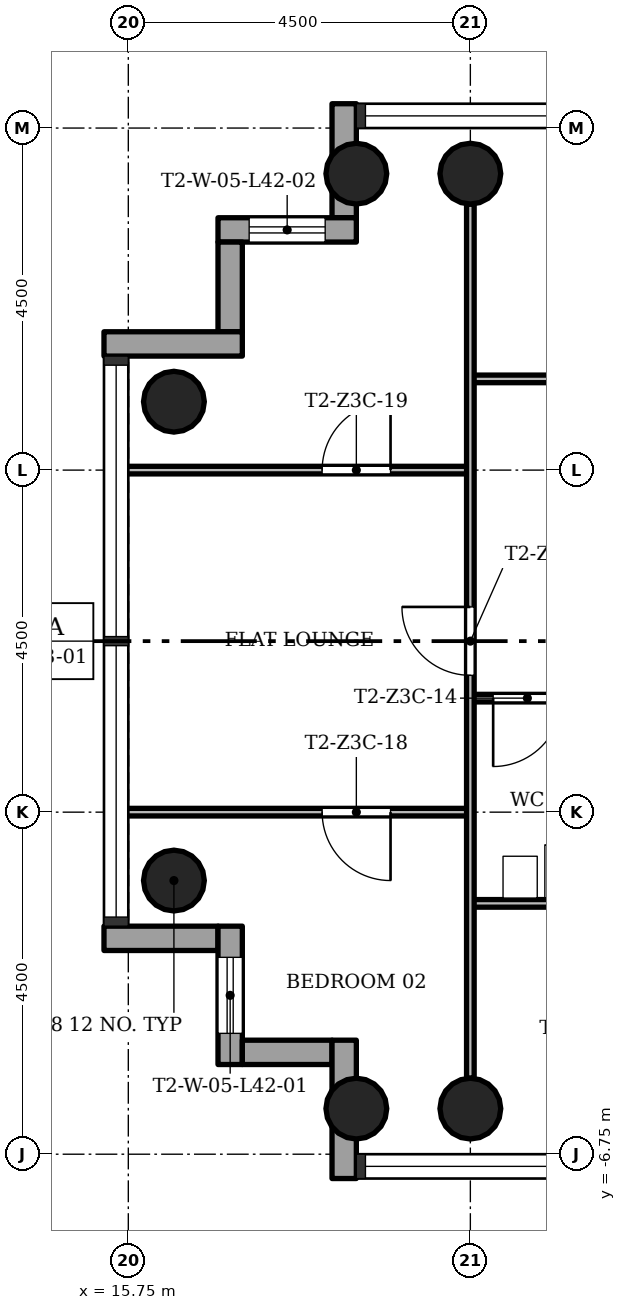
"""IFC4 building model, lengths in metres.
Left out: names, types, materials, properties, quantities, classifications, styles, units other than length and angle.
Written with IfcOpenShell. Run it as: python <this file> out.ifc"""

import sys

from ifc_helpers import new_model, si_unit, direction, frame, frame_2d, origin, origin_2d, place, context, subcontext, project, spatial, rectangle, hollow_circle, extrude, element, fill, save


model = new_model("IFC4")
c1 = context("Model", 3, precision=1e-05, world=origin(), true_north=direction((0.0, 1.0)))
c2 = subcontext(c1, "Body", "Model", "MODEL_VIEW")
j1 = project(units=[si_unit("LENGTHUNIT", "METRE"), si_unit("PLANEANGLEUNIT", "RADIAN")], contexts=[c1])
p1 = place(None, origin())
s1 = spatial("IfcSite", under=j1, at=p1, CompositionType="ELEMENT")
p2 = place(p1, origin())
s2 = spatial("IfcBuilding", under=s1, at=p2, CompositionType="ELEMENT")
p3 = place(p2, frame((0.0, 0.0, 154.1)))
s3 = spatial("IfcBuildingStorey", under=s2, at=p3, CompositionType="ELEMENT", Elevation=154.1)
for number, where, z_axis, x_axis in (
    (1, (20.25, 6.15, 0.0), (0.0, 0.0, 1.0), (1.0, 0.0, 0.0)),
    (2, (20.25, -6.15, 0.0), (0.0, 0.0, 1.0), (1.0, 0.0, 0.0)),
    (3, (18.75, 6.15, 0.0), (0.0, 0.0, 1.0), (1.0, 0.0, 0.0)),
    (4, (18.75, -6.15, 0.0), (0.0, 0.0, 1.0), (1.0, 0.0, 0.0)),
    (5, (16.35, 3.15, 0.0), (0.0, 0.0, 1.0), (1.0, 0.0, 0.0)),
    (6, (16.35, -3.15, 0.0), (0.0, 0.0, 1.0), (1.0, 0.0, 0.0)),
):
    element("IfcColumn", number, at=place(p3, frame(where, z_axis=z_axis, x_axis=x_axis)), inside=s3, PredefinedType="COLUMN", context=c2, shape_type="SweptSolid", body=[
        extrude(hollow_circle(Radius=0.4, WallThickness=0.028, at=origin_2d()), origin(), (0.0, 0.0, 1.0), 3.4),
    ])
p4 = place(p3, frame((18.59, 7.07, -0.3), z_axis=(0.0, 0.0, 1.0), x_axis=(0.0, -1.0, 0.0)))
e7 = element("IfcWall", 7, at=p4, inside=s3, PredefinedType="STANDARD", context=c2, shape_type="SweptSolid", body=[
    extrude(rectangle(XDim=1.5, YDim=0.32, at=frame_2d((0.75, 0.0))), origin(), (0.0, 0.0, 1.0), 3.4),
])
p5 = place(p3, frame((18.75, 5.41, -0.3), z_axis=(0.0, 0.0, 1.0), x_axis=(-1.0, 0.0, 0.0)))
e8 = element("IfcWall", 8, at=p5, inside=s3, PredefinedType="STANDARD", context=c2, shape_type="SweptSolid", body=[
    extrude(rectangle(XDim=1.82, YDim=0.32, at=frame_2d((0.91, 0.0))), origin(), (0.0, 0.0, 1.0), 3.4),
])
p6 = place(p5, frame((0.41, 0.0, 1.2)))
e9 = element("IfcOpeningElement", 9, at=p6, cuts=e8, PredefinedType="OPENING", context=c2, shape_type="SweptSolid", body=[
    extrude(rectangle(XDim=1.0, YDim=1.5, at=frame_2d((0.5, 0.75))), frame((0.0, 0.17, 0.0), z_axis=(0.0, -1.0, 0.0), x_axis=(1.0, 0.0, 0.0)), (0.0, 0.0, 1.0), 0.34),
])
p7 = place(p3, frame((17.09, 5.25, -0.3), z_axis=(0.0, 0.0, 1.0), x_axis=(0.0, -1.0, 0.0)))
e10 = element("IfcWall", 10, at=p7, inside=s3, PredefinedType="STANDARD", context=c2, shape_type="SweptSolid", body=[
    extrude(rectangle(XDim=1.18, YDim=0.32, at=frame_2d((0.59, 0.0))), origin(), (0.0, 0.0, 1.0), 3.4),
])
p8 = place(p3, frame((17.25, 3.91, -0.3), z_axis=(0.0, 0.0, 1.0), x_axis=(-1.0, 0.0, 0.0)))
e11 = element("IfcWall", 11, at=p8, inside=s3, PredefinedType="STANDARD", context=c2, shape_type="SweptSolid", body=[
    extrude(rectangle(XDim=1.82, YDim=0.32, at=frame_2d((0.91, 0.0))), origin(), (0.0, 0.0, 1.0), 3.4),
])
p9 = place(p3, frame((15.43, -3.91, -0.3), z_axis=(0.0, 0.0, 1.0), x_axis=(1.0, 0.0, 0.0)))
e12 = element("IfcWall", 12, at=p9, inside=s3, PredefinedType="STANDARD", context=c2, shape_type="SweptSolid", body=[
    extrude(rectangle(XDim=1.5, YDim=0.32, at=frame_2d((0.75, 0.0))), origin(), (0.0, 0.0, 1.0), 3.4),
])
p10 = place(p3, frame((17.09, -3.75, -0.3), z_axis=(0.0, 0.0, 1.0), x_axis=(0.0, -1.0, 0.0)))
e13 = element("IfcWall", 13, at=p10, inside=s3, PredefinedType="STANDARD", context=c2, shape_type="SweptSolid", body=[
    extrude(rectangle(XDim=1.82, YDim=0.32, at=frame_2d((0.91, 0.0))), origin(), (0.0, 0.0, 1.0), 3.4),
])
p11 = place(p10, frame((0.41, 0.0, 1.2)))
e14 = element("IfcOpeningElement", 14, at=p11, cuts=e13, PredefinedType="OPENING", context=c2, shape_type="SweptSolid", body=[
    extrude(rectangle(XDim=1.0, YDim=1.5, at=frame_2d((0.5, 0.75))), frame((0.0, 0.17, 0.0), z_axis=(0.0, -1.0, 0.0), x_axis=(1.0, 0.0, 0.0)), (0.0, 0.0, 1.0), 0.34),
])
p12 = place(p3, frame((17.25, -5.41, -0.3), z_axis=(0.0, 0.0, 1.0), x_axis=(1.0, 0.0, 0.0)))
e15 = element("IfcWall", 15, at=p12, inside=s3, PredefinedType="STANDARD", context=c2, shape_type="SweptSolid", body=[
    extrude(rectangle(XDim=1.18, YDim=0.32, at=frame_2d((0.59, 0.0))), origin(), (0.0, 0.0, 1.0), 3.4),
])
p13 = place(p3, frame((18.59, -5.25, -0.3), z_axis=(0.0, 0.0, 1.0), x_axis=(0.0, -1.0, 0.0)))
e16 = element("IfcWall", 16, at=p13, inside=s3, PredefinedType="STANDARD", context=c2, shape_type="SweptSolid", body=[
    extrude(rectangle(XDim=1.82, YDim=0.32, at=frame_2d((0.91, 0.0))), origin(), (0.0, 0.0, 1.0), 3.4),
])
p14 = place(p3, frame((24.75, -3.45, 0.0), z_axis=(0.0, 0.0, 1.0), x_axis=(-1.0, 0.0, 0.0)))
e17 = element("IfcWall", 17, at=p14, inside=s3, PredefinedType="PARTITIONING", context=c2, shape_type="SweptSolid", body=[
    extrude(rectangle(XDim=4.5, YDim=0.1, at=frame_2d((2.25, 0.0))), origin(), (0.0, 0.0, 1.0), 3.0),
])
p15 = place(p14, frame((0.15, 0.0, 0.0)))
e18 = element("IfcOpeningElement", 18, at=p15, cuts=e17, PredefinedType="OPENING", context=c2, shape_type="SweptSolid", body=[
    extrude(rectangle(XDim=0.9, YDim=2.1, at=frame_2d((0.45, 1.05))), frame((0.0, 0.06, 0.0), z_axis=(0.0, -1.0, 0.0), x_axis=(1.0, 0.0, 0.0)), (0.0, 0.0, 1.0), 0.12),
])
p16 = place(p3, frame((20.25, -2.25, 0.0), z_axis=(0.0, 0.0, 1.0), x_axis=(-1.0, 0.0, 0.0)))
e19 = element("IfcWall", 19, at=p16, inside=s3, PredefinedType="PARTITIONING", context=c2, shape_type="SweptSolid", body=[
    extrude(rectangle(XDim=4.6, YDim=0.1, at=frame_2d((2.3, 0.0))), origin(), (0.0, 0.0, 1.0), 3.0),
])
p17 = place(p16, frame((1.05, 0.0, 0.0)))
e20 = element("IfcOpeningElement", 20, at=p17, cuts=e19, PredefinedType="OPENING", context=c2, shape_type="SweptSolid", body=[
    extrude(rectangle(XDim=0.9, YDim=2.1, at=frame_2d((0.45, 1.05))), frame((0.0, 0.06, 0.0), z_axis=(0.0, -1.0, 0.0), x_axis=(1.0, 0.0, 0.0)), (0.0, 0.0, 1.0), 0.12),
])
p18 = place(p3, frame((23.55, -0.75, 0.0), z_axis=(0.0, 0.0, 1.0), x_axis=(-1.0, 0.0, 0.0)))
e21 = element("IfcWall", 21, at=p18, inside=s3, PredefinedType="PARTITIONING", context=c2, shape_type="SweptSolid", body=[
    extrude(rectangle(XDim=3.3, YDim=0.1, at=frame_2d((1.65, 0.0))), origin(), (0.0, 0.0, 1.0), 3.0),
])
p19 = place(p18, frame((0.45, 0.0, 0.0)))
e22 = element("IfcOpeningElement", 22, at=p19, cuts=e21, PredefinedType="OPENING", context=c2, shape_type="SweptSolid", body=[
    extrude(rectangle(XDim=0.9, YDim=2.1, at=frame_2d((0.45, 1.05))), frame((0.0, 0.06, 0.0), z_axis=(0.0, -1.0, 0.0), x_axis=(1.0, 0.0, 0.0)), (0.0, 0.0, 1.0), 0.12),
])
p20 = place(p18, frame((2.1, 0.0, 0.0)))
e23 = element("IfcOpeningElement", 23, at=p20, cuts=e21, PredefinedType="OPENING", context=c2, shape_type="SweptSolid", body=[
    extrude(rectangle(XDim=0.9, YDim=2.1, at=frame_2d((0.45, 1.05))), frame((0.0, 0.06, 0.0), z_axis=(0.0, -1.0, 0.0), x_axis=(1.0, 0.0, 0.0)), (0.0, 0.0, 1.0), 0.12),
])
p21 = place(p3, frame((20.25, 2.25, 0.0), z_axis=(0.0, 0.0, 1.0), x_axis=(-1.0, 0.0, 0.0)))
e24 = element("IfcWall", 24, at=p21, inside=s3, PredefinedType="PARTITIONING", context=c2, shape_type="SweptSolid", body=[
    extrude(rectangle(XDim=4.6, YDim=0.1, at=frame_2d((2.3, 0.0))), origin(), (0.0, 0.0, 1.0), 3.0),
])
p22 = place(p21, frame((1.05, 0.0, 0.0)))
e25 = element("IfcOpeningElement", 25, at=p22, cuts=e24, PredefinedType="OPENING", context=c2, shape_type="SweptSolid", body=[
    extrude(rectangle(XDim=0.9, YDim=2.1, at=frame_2d((0.45, 1.05))), frame((0.0, 0.06, 0.0), z_axis=(0.0, -1.0, 0.0), x_axis=(1.0, 0.0, 0.0)), (0.0, 0.0, 1.0), 0.12),
])
p23 = place(p3, frame((24.75, 3.45, 0.0), z_axis=(0.0, 0.0, 1.0), x_axis=(-1.0, 0.0, 0.0)))
e26 = element("IfcWall", 26, at=p23, inside=s3, PredefinedType="PARTITIONING", context=c2, shape_type="SweptSolid", body=[
    extrude(rectangle(XDim=4.5, YDim=0.1, at=frame_2d((2.25, 0.0))), origin(), (0.0, 0.0, 1.0), 3.0),
])
p24 = place(p23, frame((0.15, 0.0, 0.0)))
e27 = element("IfcOpeningElement", 27, at=p24, cuts=e26, PredefinedType="OPENING", context=c2, shape_type="SweptSolid", body=[
    extrude(rectangle(XDim=0.9, YDim=2.1, at=frame_2d((0.45, 1.05))), frame((0.0, 0.06, 0.0), z_axis=(0.0, -1.0, 0.0), x_axis=(1.0, 0.0, 0.0)), (0.0, 0.0, 1.0), 0.12),
])
p25 = place(p3, frame((20.25, -5.75, 0.0), z_axis=(0.0, 0.0, 1.0), x_axis=(0.0, 1.0, 0.0)))
e28 = element("IfcWall", 28, at=p25, inside=s3, PredefinedType="PARTITIONING", context=c2, shape_type="SweptSolid", body=[
    extrude(rectangle(XDim=11.5, YDim=0.1, at=frame_2d((5.75, 0.0))), origin(), (0.0, 0.0, 1.0), 3.0),
])
p26 = place(p25, frame((5.3, 0.0, 0.0)))
e29 = element("IfcOpeningElement", 29, at=p26, cuts=e28, PredefinedType="OPENING", context=c2, shape_type="SweptSolid", body=[
    extrude(rectangle(XDim=0.9, YDim=2.1, at=frame_2d((0.45, 1.05))), frame((0.0, 0.06, 0.0), z_axis=(0.0, -1.0, 0.0), x_axis=(1.0, 0.0, 0.0)), (0.0, 0.0, 1.0), 0.12),
])
p27 = place(p20, origin())
e30 = element("IfcDoor", 30, at=p27, inside=s3, OperationType="SINGLE_SWING_LEFT", PredefinedType="DOOR", context=c2, shape_type="SweptSolid", body=[
    extrude(rectangle(XDim=0.9, YDim=2.1, at=frame_2d((0.45, 1.05))), frame((0.0, 0.025, 0.0), z_axis=(0.0, -1.0, 0.0), x_axis=(1.0, 0.0, 0.0)), (0.0, 0.0, 1.0), 0.05),
])
fill(e23, e30)
p28 = place(p26, origin())
e31 = element("IfcDoor", 31, at=p28, inside=s3, OperationType="SINGLE_SWING_LEFT", PredefinedType="DOOR", context=c2, shape_type="SweptSolid", body=[
    extrude(rectangle(XDim=0.9, YDim=2.1, at=frame_2d((0.45, 1.05))), frame((0.0, 0.025, 0.0), z_axis=(0.0, -1.0, 0.0), x_axis=(1.0, 0.0, 0.0)), (0.0, 0.0, 1.0), 0.05),
])
fill(e29, e31)
p29 = place(p17, origin())
e32 = element("IfcDoor", 32, at=p29, inside=s3, OperationType="SINGLE_SWING_RIGHT", PredefinedType="DOOR", context=c2, shape_type="SweptSolid", body=[
    extrude(rectangle(XDim=0.9, YDim=2.1, at=frame_2d((0.45, 1.05))), frame((0.0, 0.025, 0.0), z_axis=(0.0, -1.0, 0.0), x_axis=(1.0, 0.0, 0.0)), (0.0, 0.0, 1.0), 0.05),
])
fill(e20, e32)
p30 = place(p22, origin())
e33 = element("IfcDoor", 33, at=p30, inside=s3, OperationType="SINGLE_SWING_LEFT", PredefinedType="DOOR", context=c2, shape_type="SweptSolid", body=[
    extrude(rectangle(XDim=0.9, YDim=2.1, at=frame_2d((0.45, 1.05))), frame((0.0, 0.025, 0.0), z_axis=(0.0, -1.0, 0.0), x_axis=(1.0, 0.0, 0.0)), (0.0, 0.0, 1.0), 0.05),
])
fill(e25, e33)
p31 = place(p11, origin())
e34 = element("IfcWindow", 34, at=p31, inside=s3, PartitioningType="SINGLE_PANEL", PredefinedType="WINDOW", context=c2, shape_type="SweptSolid", body=[
    extrude(rectangle(XDim=1.0, YDim=1.5, at=frame_2d((0.5, 0.75))), frame((0.0, 0.03, 0.0), z_axis=(0.0, -1.0, 0.0), x_axis=(1.0, 0.0, 0.0)), (0.0, 0.0, 1.0), 0.06),
])
fill(e14, e34)
p32 = place(p6, origin())
e35 = element("IfcWindow", 35, at=p32, inside=s3, PartitioningType="SINGLE_PANEL", PredefinedType="WINDOW", context=c2, shape_type="SweptSolid", body=[
    extrude(rectangle(XDim=1.0, YDim=1.5, at=frame_2d((0.5, 0.75))), frame((0.0, 0.03, 0.0), z_axis=(0.0, -1.0, 0.0), x_axis=(1.0, 0.0, 0.0)), (0.0, 0.0, 1.0), 0.06),
])
fill(e9, e35)
save(model, sys.argv[1])
